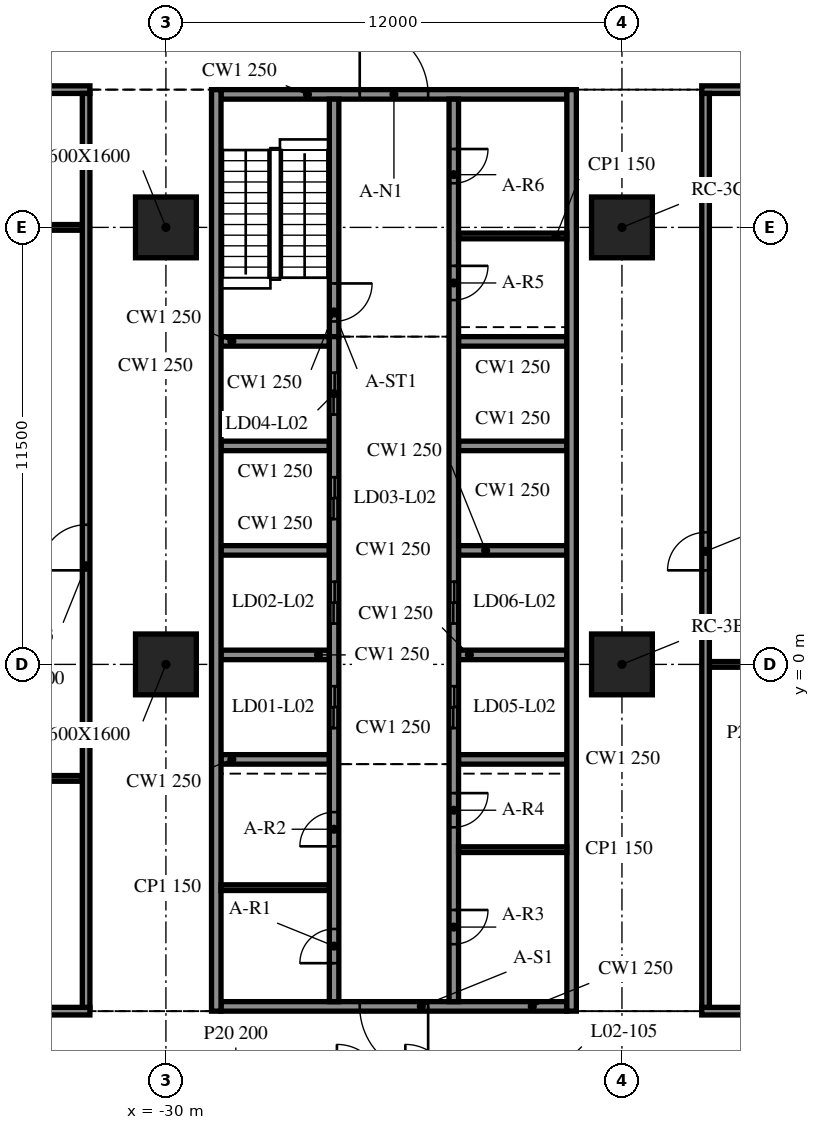
"""IFC4 building model, lengths in metres.
Left out: names, types, materials, properties, quantities, classifications, styles, units other than length and angle.
Written with IfcOpenShell. Run it as: python <this file> out.ifc"""

import sys

from ifc_helpers import new_model, si_unit, direction, frame, frame_2d, origin, origin_2d, place, context, subcontext, project, spatial, rectangle, extrude, element, fill, save


model = new_model("IFC4")
c1 = context("Model", 3, precision=1e-05, world=origin(), true_north=direction((0.0, 1.0)))
c2 = subcontext(c1, "Body", "Model", "MODEL_VIEW")
j1 = project(units=[si_unit("LENGTHUNIT", "METRE"), si_unit("PLANEANGLEUNIT", "RADIAN")], contexts=[c1])
p1 = place(None, origin())
s1 = spatial("IfcSite", under=j1, at=p1, CompositionType="ELEMENT")
p2 = place(p1, origin())
s2 = spatial("IfcBuilding", under=s1, at=p2, CompositionType="ELEMENT")
p3 = place(p2, frame((0.0, 0.0, 11.5)))
s3 = spatial("IfcBuildingStorey", under=s2, at=p3, CompositionType="ELEMENT", Elevation=11.5)
for number, where, z_axis, x_axis in (
    (1, (-30.0, 0.0, -0.34), (0.0, 0.0, 1.0), (1.0, 0.0, 0.0)),
    (2, (-30.0, 11.5, -0.34), (0.0, 0.0, 1.0), (1.0, 0.0, 0.0)),
    (3, (-18.0, 0.0, -0.34), (0.0, 0.0, 1.0), (1.0, 0.0, 0.0)),
    (4, (-18.0, 11.5, -0.34), (0.0, 0.0, 1.0), (1.0, 0.0, 0.0)),
):
    element("IfcColumn", number, at=place(p3, frame(where, z_axis=z_axis, x_axis=x_axis)), inside=s3, PredefinedType="COLUMN", context=c2, shape_type="SweptSolid", body=[
        extrude(rectangle(XDim=1.6, YDim=1.6, at=origin_2d()), origin(), (0.0, 0.0, 1.0), 4.3),
    ])
for number, where, z_axis, x_axis in (
    (5, (-28.675, 15.125, 0.0), (0.0, 0.0, 1.0), (0.0, -1.0, 0.0)),
    (6, (-19.325, -9.125, 0.0), (0.0, 0.0, 1.0), (0.0, 1.0, 0.0)),
):
    element("IfcWall", number, at=place(p3, frame(where, z_axis=z_axis, x_axis=x_axis)), inside=s3, PredefinedType="SOLIDWALL", context=c2, shape_type="SweptSolid", body=[
        extrude(rectangle(XDim=24.25, YDim=0.25, at=frame_2d((12.125, 0.0))), origin(), (0.0, 0.0, 1.0), 3.96),
    ])
p4 = place(p3, frame((-19.45, -9.0, 0.0), z_axis=(0.0, 0.0, 1.0), x_axis=(-1.0, 0.0, 0.0)))
e7 = element("IfcWall", 7, at=p4, inside=s3, PredefinedType="SOLIDWALL", context=c2, shape_type="SweptSolid", body=[
    extrude(rectangle(XDim=9.1, YDim=0.25, at=frame_2d((4.55, 0.0))), origin(), (0.0, 0.0, 1.0), 3.96),
])
p5 = place(p4, frame((3.65, 0.0, 0.0)))
e8 = element("IfcOpeningElement", 8, at=p5, cuts=e7, PredefinedType="OPENING", context=c2, shape_type="SweptSolid", body=[
    extrude(rectangle(XDim=1.8, YDim=2.1, at=frame_2d((0.9, 1.05))), frame((0.0, 0.135, 0.0), z_axis=(0.0, -1.0, 0.0), x_axis=(1.0, 0.0, 0.0)), (0.0, 0.0, 1.0), 0.27),
])
p6 = place(p3, frame((-28.55, 15.0, 0.0), z_axis=(0.0, 0.0, 1.0), x_axis=(1.0, 0.0, 0.0)))
e9 = element("IfcWall", 9, at=p6, inside=s3, PredefinedType="SOLIDWALL", context=c2, shape_type="SweptSolid", body=[
    extrude(rectangle(XDim=9.1, YDim=0.25, at=frame_2d((4.55, 0.0))), origin(), (0.0, 0.0, 1.0), 3.96),
])
p7 = place(p6, frame((3.65, 0.0, 0.0)))
e10 = element("IfcOpeningElement", 10, at=p7, cuts=e9, PredefinedType="OPENING", context=c2, shape_type="SweptSolid", body=[
    extrude(rectangle(XDim=1.8, YDim=2.1, at=frame_2d((0.9, 1.05))), frame((0.0, 0.135, 0.0), z_axis=(0.0, -1.0, 0.0), x_axis=(1.0, 0.0, 0.0)), (0.0, 0.0, 1.0), 0.27),
])
p8 = place(p3, frame((-25.575, -8.875, 0.0), z_axis=(0.0, 0.0, 1.0), x_axis=(0.0, 1.0, 0.0)))
e11 = element("IfcWall", 11, at=p8, inside=s3, PredefinedType="SOLIDWALL", context=c2, shape_type="SweptSolid", body=[
    extrude(rectangle(XDim=17.5, YDim=0.25, at=frame_2d((8.75, 0.0))), origin(), (0.0, 0.0, 1.0), 3.96),
])
p9 = place(p8, frame((7.2, 0.0, 0.0)))
e12 = element("IfcOpeningElement", 12, at=p9, cuts=e11, PredefinedType="OPENING", context=c2, shape_type="SweptSolid", body=[
    extrude(rectangle(XDim=1.1, YDim=2.1, at=frame_2d((0.55, 1.05))), frame((0.0, 0.135, 0.0), z_axis=(0.0, -1.0, 0.0), x_axis=(1.0, 0.0, 0.0)), (0.0, 0.0, 1.0), 0.27),
])
p10 = place(p8, frame((9.95, 0.0, 0.0)))
e13 = element("IfcOpeningElement", 13, at=p10, cuts=e11, PredefinedType="OPENING", context=c2, shape_type="SweptSolid", body=[
    extrude(rectangle(XDim=1.1, YDim=2.1, at=frame_2d((0.55, 1.05))), frame((0.0, 0.135, 0.0), z_axis=(0.0, -1.0, 0.0), x_axis=(1.0, 0.0, 0.0)), (0.0, 0.0, 1.0), 0.27),
])
p11 = place(p8, frame((12.7, 0.0, 0.0)))
e14 = element("IfcOpeningElement", 14, at=p11, cuts=e11, PredefinedType="OPENING", context=c2, shape_type="SweptSolid", body=[
    extrude(rectangle(XDim=1.1, YDim=2.1, at=frame_2d((0.55, 1.05))), frame((0.0, 0.135, 0.0), z_axis=(0.0, -1.0, 0.0), x_axis=(1.0, 0.0, 0.0)), (0.0, 0.0, 1.0), 0.27),
])
p12 = place(p8, frame((15.45, 0.0, 0.0)))
e15 = element("IfcOpeningElement", 15, at=p12, cuts=e11, PredefinedType="OPENING", context=c2, shape_type="SweptSolid", body=[
    extrude(rectangle(XDim=1.1, YDim=2.1, at=frame_2d((0.55, 1.05))), frame((0.0, 0.135, 0.0), z_axis=(0.0, -1.0, 0.0), x_axis=(1.0, 0.0, 0.0)), (0.0, 0.0, 1.0), 0.27),
])
p13 = place(p8, frame((1.012, 0.0, 0.0)))
e16 = element("IfcOpeningElement", 16, at=p13, cuts=e11, PredefinedType="OPENING", context=c2, shape_type="SweptSolid", body=[
    extrude(rectangle(XDim=0.9, YDim=2.1, at=frame_2d((0.45, 1.05))), frame((0.0, 0.135, 0.0), z_axis=(0.0, -1.0, 0.0), x_axis=(1.0, 0.0, 0.0)), (0.0, 0.0, 1.0), 0.27),
])
p14 = place(p8, frame((4.087, 0.0, 0.0)))
e17 = element("IfcOpeningElement", 17, at=p14, cuts=e11, PredefinedType="OPENING", context=c2, shape_type="SweptSolid", body=[
    extrude(rectangle(XDim=0.9, YDim=2.1, at=frame_2d((0.45, 1.05))), frame((0.0, 0.135, 0.0), z_axis=(0.0, -1.0, 0.0), x_axis=(1.0, 0.0, 0.0)), (0.0, 0.0, 1.0), 0.27),
])
p15 = place(p3, frame((-25.575, 14.875, 0.0), z_axis=(0.0, 0.0, 1.0), x_axis=(0.0, -1.0, 0.0)))
e18 = element("IfcWall", 18, at=p15, inside=s3, PredefinedType="SOLIDWALL", context=c2, shape_type="SweptSolid", body=[
    extrude(rectangle(XDim=6.25, YDim=0.25, at=frame_2d((3.125, 0.0))), origin(), (0.0, 0.0, 1.0), 3.96),
])
p16 = place(p15, frame((4.85, 0.0, 0.0)))
e19 = element("IfcOpeningElement", 19, at=p16, cuts=e18, PredefinedType="OPENING", context=c2, shape_type="SweptSolid", body=[
    extrude(rectangle(XDim=1.0, YDim=2.1, at=frame_2d((0.5, 1.05))), frame((0.0, 0.135, 0.0), z_axis=(0.0, -1.0, 0.0), x_axis=(1.0, 0.0, 0.0)), (0.0, 0.0, 1.0), 0.27),
])
p17 = place(p3, frame((-22.425, 14.875, 0.0), z_axis=(0.0, 0.0, 1.0), x_axis=(0.0, -1.0, 0.0)))
e20 = element("IfcWall", 20, at=p17, inside=s3, PredefinedType="SOLIDWALL", context=c2, shape_type="SweptSolid", body=[
    extrude(rectangle(XDim=23.75, YDim=0.25, at=frame_2d((11.875, 0.0))), origin(), (0.0, 0.0, 1.0), 3.96),
])
p18 = place(p17, frame((15.45, 0.0, 0.0)))
e21 = element("IfcOpeningElement", 21, at=p18, cuts=e20, PredefinedType="OPENING", context=c2, shape_type="SweptSolid", body=[
    extrude(rectangle(XDim=1.1, YDim=2.1, at=frame_2d((0.55, 1.05))), frame((0.0, 0.135, 0.0), z_axis=(0.0, -1.0, 0.0), x_axis=(1.0, 0.0, 0.0)), (0.0, 0.0, 1.0), 0.27),
])
p19 = place(p17, frame((12.7, 0.0, 0.0)))
e22 = element("IfcOpeningElement", 22, at=p19, cuts=e20, PredefinedType="OPENING", context=c2, shape_type="SweptSolid", body=[
    extrude(rectangle(XDim=1.1, YDim=2.1, at=frame_2d((0.55, 1.05))), frame((0.0, 0.135, 0.0), z_axis=(0.0, -1.0, 0.0), x_axis=(1.0, 0.0, 0.0)), (0.0, 0.0, 1.0), 0.27),
])
p20 = place(p17, frame((21.337, 0.0, 0.0)))
e23 = element("IfcOpeningElement", 23, at=p20, cuts=e20, PredefinedType="OPENING", context=c2, shape_type="SweptSolid", body=[
    extrude(rectangle(XDim=0.9, YDim=2.1, at=frame_2d((0.45, 1.05))), frame((0.0, 0.135, 0.0), z_axis=(0.0, -1.0, 0.0), x_axis=(1.0, 0.0, 0.0)), (0.0, 0.0, 1.0), 0.27),
])
p21 = place(p17, frame((18.262, 0.0, 0.0)))
e24 = element("IfcOpeningElement", 24, at=p21, cuts=e20, PredefinedType="OPENING", context=c2, shape_type="SweptSolid", body=[
    extrude(rectangle(XDim=0.9, YDim=2.1, at=frame_2d((0.45, 1.05))), frame((0.0, 0.135, 0.0), z_axis=(0.0, -1.0, 0.0), x_axis=(1.0, 0.0, 0.0)), (0.0, 0.0, 1.0), 0.27),
])
p22 = place(p17, frame((4.387, 0.0, 0.0)))
e25 = element("IfcOpeningElement", 25, at=p22, cuts=e20, PredefinedType="OPENING", context=c2, shape_type="SweptSolid", body=[
    extrude(rectangle(XDim=0.9, YDim=2.1, at=frame_2d((0.45, 1.05))), frame((0.0, 0.135, 0.0), z_axis=(0.0, -1.0, 0.0), x_axis=(1.0, 0.0, 0.0)), (0.0, 0.0, 1.0), 0.27),
])
p23 = place(p17, frame((1.312, 0.0, 0.0)))
e26 = element("IfcOpeningElement", 26, at=p23, cuts=e20, PredefinedType="OPENING", context=c2, shape_type="SweptSolid", body=[
    extrude(rectangle(XDim=0.9, YDim=2.1, at=frame_2d((0.45, 1.05))), frame((0.0, 0.135, 0.0), z_axis=(0.0, -1.0, 0.0), x_axis=(1.0, 0.0, 0.0)), (0.0, 0.0, 1.0), 0.27),
])
for number, where, z_axis, x_axis in (
    (27, (-28.55, -2.5, 0.0), (0.0, 0.0, 1.0), (1.0, 0.0, 0.0)),
    (28, (-28.55, 0.25, 0.0), (0.0, 0.0, 1.0), (1.0, 0.0, 0.0)),
    (29, (-28.55, 3.0, 0.0), (0.0, 0.0, 1.0), (1.0, 0.0, 0.0)),
    (30, (-28.55, 5.75, 0.0), (0.0, 0.0, 1.0), (1.0, 0.0, 0.0)),
    (31, (-28.55, 8.5, 0.0), (0.0, 0.0, 1.0), (1.0, 0.0, 0.0)),
    (32, (-22.3, -2.5, 0.0), (0.0, 0.0, 1.0), (1.0, 0.0, 0.0)),
    (33, (-22.3, 0.25, 0.0), (0.0, 0.0, 1.0), (1.0, 0.0, 0.0)),
    (34, (-22.3, 3.0, 0.0), (0.0, 0.0, 1.0), (1.0, 0.0, 0.0)),
    (35, (-22.3, 5.75, 0.0), (0.0, 0.0, 1.0), (1.0, 0.0, 0.0)),
    (36, (-22.3, 8.5, 0.0), (0.0, 0.0, 1.0), (1.0, 0.0, 0.0)),
):
    element("IfcWall", number, at=place(p3, frame(where, z_axis=z_axis, x_axis=x_axis)), inside=s3, PredefinedType="SOLIDWALL", context=c2, shape_type="SweptSolid", body=[
        extrude(rectangle(XDim=2.85, YDim=0.25, at=frame_2d((1.425, 0.0))), origin(), (0.0, 0.0, 1.0), 3.96),
    ])
for number, where, z_axis, x_axis in (
    (37, (-28.55, -5.875, 0.0), (0.0, 0.0, 1.0), (1.0, 0.0, 0.0)),
    (38, (-22.3, -4.875, 0.0), (0.0, 0.0, 1.0), (1.0, 0.0, 0.0)),
    (39, (-22.3, 11.275, 0.0), (0.0, 0.0, 1.0), (1.0, 0.0, 0.0)),
):
    element("IfcWall", number, at=place(p3, frame(where, z_axis=z_axis, x_axis=x_axis)), inside=s3, PredefinedType="PARTITIONING", context=c2, shape_type="SweptSolid", body=[
        extrude(rectangle(XDim=2.85, YDim=0.15, at=frame_2d((1.425, 0.0))), origin(), (0.0, 0.0, 1.0), 3.96),
    ])
p24 = place(p3, frame((-45.95, -9.125, 0.0), z_axis=(0.0, 0.0, 1.0), x_axis=(1.0, 0.0, 0.0)))
e40 = element("IfcWall", 40, at=p24, inside=s3, PredefinedType="PARTITIONING", context=c2, shape_type="SweptSolid", body=[
    extrude(rectangle(XDim=13.95, YDim=0.2, at=frame_2d((6.975, 0.0))), origin(), (0.0, 0.0, 1.0), 3.96),
])
p25 = place(p24, frame((5.5, 0.0, 0.0)))
e41 = element("IfcOpeningElement", 41, at=p25, cuts=e40, PredefinedType="OPENING", context=c2, shape_type="SweptSolid", body=[
    extrude(rectangle(XDim=1.2, YDim=2.1, at=frame_2d((0.6, 1.05))), frame((0.0, 0.11, 0.0), z_axis=(0.0, -1.0, 0.0), x_axis=(1.0, 0.0, 0.0)), (0.0, 0.0, 1.0), 0.22),
])
p26 = place(p24, frame((7.3, 0.0, 0.0)))
e42 = element("IfcOpeningElement", 42, at=p26, cuts=e40, PredefinedType="OPENING", context=c2, shape_type="SweptSolid", body=[
    extrude(rectangle(XDim=1.2, YDim=2.1, at=frame_2d((0.6, 1.05))), frame((0.0, 0.11, 0.0), z_axis=(0.0, -1.0, 0.0), x_axis=(1.0, 0.0, 0.0)), (0.0, 0.0, 1.0), 0.22),
])
p27 = place(p3, frame((-15.9, -9.125, 0.0), z_axis=(0.0, 0.0, 1.0), x_axis=(1.0, 0.0, 0.0)))
e43 = element("IfcWall", 43, at=p27, inside=s3, PredefinedType="PARTITIONING", context=c2, shape_type="SweptSolid", body=[
    extrude(rectangle(XDim=7.7, YDim=0.2, at=frame_2d((3.85, 0.0))), origin(), (0.0, 0.0, 1.0), 3.96),
])
p28 = place(p27, frame((3.3, 0.0, 0.0)))
e44 = element("IfcOpeningElement", 44, at=p28, cuts=e43, PredefinedType="OPENING", context=c2, shape_type="SweptSolid", body=[
    extrude(rectangle(XDim=1.0, YDim=2.1, at=frame_2d((0.5, 1.05))), frame((0.0, 0.11, 0.0), z_axis=(0.0, -1.0, 0.0), x_axis=(1.0, 0.0, 0.0)), (0.0, 0.0, 1.0), 0.22),
])
p29 = place(p3, frame((-45.75, -3.0, 0.0), z_axis=(0.0, 0.0, 1.0), x_axis=(1.0, 0.0, 0.0)))
e45 = element("IfcWall", 45, at=p29, inside=s3, PredefinedType="PARTITIONING", context=c2, shape_type="SweptSolid", body=[
    extrude(rectangle(XDim=13.55, YDim=0.15, at=frame_2d((6.775, 0.0))), origin(), (0.0, 0.0, 1.0), 3.96),
])
p30 = place(p3, frame((-15.7, 0.0, 0.0), z_axis=(0.0, 0.0, 1.0), x_axis=(1.0, 0.0, 0.0)))
e46 = element("IfcWall", 46, at=p30, inside=s3, PredefinedType="PARTITIONING", context=c2, shape_type="SweptSolid", body=[
    extrude(rectangle(XDim=7.3, YDim=0.15, at=frame_2d((3.65, 0.0))), origin(), (0.0, 0.0, 1.0), 3.96),
])
p31 = place(p3, frame((-41.2, 11.5, 0.0), z_axis=(0.0, 0.0, 1.0), x_axis=(1.0, 0.0, 0.0)))
e47 = element("IfcWall", 47, at=p31, inside=s3, PredefinedType="PARTITIONING", context=c2, shape_type="SweptSolid", body=[
    extrude(rectangle(XDim=9.0, YDim=0.15, at=frame_2d((4.5, 0.0))), origin(), (0.0, 0.0, 1.0), 3.96),
])
p32 = place(p3, frame((-45.95, 15.125, 0.0), z_axis=(0.0, 0.0, 1.0), x_axis=(1.0, 0.0, 0.0)))
e48 = element("IfcWall", 48, at=p32, inside=s3, PredefinedType="PARTITIONING", context=c2, shape_type="SweptSolid", body=[
    extrude(rectangle(XDim=13.95, YDim=0.2, at=frame_2d((6.975, 0.0))), origin(), (0.0, 0.0, 1.0), 3.96),
])
p33 = place(p32, frame((5.5, 0.0, 0.0)))
e49 = element("IfcOpeningElement", 49, at=p33, cuts=e48, PredefinedType="OPENING", context=c2, shape_type="SweptSolid", body=[
    extrude(rectangle(XDim=1.2, YDim=2.1, at=frame_2d((0.6, 1.05))), frame((0.0, 0.11, 0.0), z_axis=(0.0, -1.0, 0.0), x_axis=(1.0, 0.0, 0.0)), (0.0, 0.0, 1.0), 0.22),
])
p34 = place(p32, frame((7.3, 0.0, 0.0)))
e50 = element("IfcOpeningElement", 50, at=p34, cuts=e48, PredefinedType="OPENING", context=c2, shape_type="SweptSolid", body=[
    extrude(rectangle(XDim=1.2, YDim=2.1, at=frame_2d((0.6, 1.05))), frame((0.0, 0.11, 0.0), z_axis=(0.0, -1.0, 0.0), x_axis=(1.0, 0.0, 0.0)), (0.0, 0.0, 1.0), 0.22),
])
p35 = place(p3, frame((-15.9, 15.125, 0.0), z_axis=(0.0, 0.0, 1.0), x_axis=(1.0, 0.0, 0.0)))
e51 = element("IfcWall", 51, at=p35, inside=s3, PredefinedType="PARTITIONING", context=c2, shape_type="SweptSolid", body=[
    extrude(rectangle(XDim=7.7, YDim=0.2, at=frame_2d((3.85, 0.0))), origin(), (0.0, 0.0, 1.0), 3.96),
])
p36 = place(p3, frame((-32.1, -9.025, 0.0), z_axis=(0.0, 0.0, 1.0), x_axis=(0.0, 1.0, 0.0)))
e52 = element("IfcWall", 52, at=p36, inside=s3, PredefinedType="PARTITIONING", context=c2, shape_type="SweptSolid", body=[
    extrude(rectangle(XDim=24.05, YDim=0.2, at=frame_2d((12.025, 0.0))), origin(), (0.0, 0.0, 1.0), 3.96),
])
p37 = place(p36, frame((11.5, 0.0, 0.0)))
e53 = element("IfcOpeningElement", 53, at=p37, cuts=e52, PredefinedType="OPENING", context=c2, shape_type="SweptSolid", body=[
    extrude(rectangle(XDim=1.2, YDim=2.1, at=frame_2d((0.6, 1.05))), frame((0.0, 0.11, 0.0), z_axis=(0.0, -1.0, 0.0), x_axis=(1.0, 0.0, 0.0)), (0.0, 0.0, 1.0), 0.22),
])
p38 = place(p3, frame((-15.8, -9.025, 0.0), z_axis=(0.0, 0.0, 1.0), x_axis=(0.0, 1.0, 0.0)))
e54 = element("IfcWall", 54, at=p38, inside=s3, PredefinedType="PARTITIONING", context=c2, shape_type="SweptSolid", body=[
    extrude(rectangle(XDim=24.05, YDim=0.2, at=frame_2d((12.025, 0.0))), origin(), (0.0, 0.0, 1.0), 3.96),
])
p39 = place(p38, frame((11.5, 0.0, 0.0)))
e55 = element("IfcOpeningElement", 55, at=p39, cuts=e54, PredefinedType="OPENING", context=c2, shape_type="SweptSolid", body=[
    extrude(rectangle(XDim=1.0, YDim=2.1, at=frame_2d((0.5, 1.05))), frame((0.0, 0.11, 0.0), z_axis=(0.0, -1.0, 0.0), x_axis=(1.0, 0.0, 0.0)), (0.0, 0.0, 1.0), 0.22),
])
p40 = place(p5, origin())
e56 = element("IfcDoor", 56, at=p40, inside=s3, OperationType="DOUBLE_DOOR_SINGLE_SWING", PredefinedType="DOOR", context=c2, shape_type="SweptSolid", body=[
    extrude(rectangle(XDim=1.8, YDim=2.1, at=frame_2d((0.9, 1.05))), frame((0.0, 0.025, 0.0), z_axis=(0.0, -1.0, 0.0), x_axis=(1.0, 0.0, 0.0)), (0.0, 0.0, 1.0), 0.05),
])
fill(e8, e56)
p41 = place(p7, origin())
e57 = element("IfcDoor", 57, at=p41, inside=s3, OperationType="DOUBLE_DOOR_SINGLE_SWING", PredefinedType="DOOR", context=c2, shape_type="SweptSolid", body=[
    extrude(rectangle(XDim=1.8, YDim=2.1, at=frame_2d((0.9, 1.05))), frame((0.0, 0.025, 0.0), z_axis=(0.0, -1.0, 0.0), x_axis=(1.0, 0.0, 0.0)), (0.0, 0.0, 1.0), 0.05),
])
fill(e10, e57)
p42 = place(p18, origin())
e58 = element("IfcDoor", 58, at=p42, inside=s3, OperationType="DOUBLE_DOOR_SLIDING", PredefinedType="DOOR", context=c2, shape_type="SweptSolid", body=[
    extrude(rectangle(XDim=1.1, YDim=2.1, at=frame_2d((0.55, 1.05))), frame((0.0, 0.025, 0.0), z_axis=(0.0, -1.0, 0.0), x_axis=(1.0, 0.0, 0.0)), (0.0, 0.0, 1.0), 0.05),
])
fill(e21, e58)
p43 = place(p19, origin())
e59 = element("IfcDoor", 59, at=p43, inside=s3, OperationType="DOUBLE_DOOR_SLIDING", PredefinedType="DOOR", context=c2, shape_type="SweptSolid", body=[
    extrude(rectangle(XDim=1.1, YDim=2.1, at=frame_2d((0.55, 1.05))), frame((0.0, 0.025, 0.0), z_axis=(0.0, -1.0, 0.0), x_axis=(1.0, 0.0, 0.0)), (0.0, 0.0, 1.0), 0.05),
])
fill(e22, e59)
p44 = place(p9, origin())
e60 = element("IfcDoor", 60, at=p44, inside=s3, OperationType="DOUBLE_DOOR_SLIDING", PredefinedType="DOOR", context=c2, shape_type="SweptSolid", body=[
    extrude(rectangle(XDim=1.1, YDim=2.1, at=frame_2d((0.55, 1.05))), frame((0.0, 0.025, 0.0), z_axis=(0.0, -1.0, 0.0), x_axis=(1.0, 0.0, 0.0)), (0.0, 0.0, 1.0), 0.05),
])
fill(e12, e60)
p45 = place(p10, origin())
e61 = element("IfcDoor", 61, at=p45, inside=s3, OperationType="DOUBLE_DOOR_SLIDING", PredefinedType="DOOR", context=c2, shape_type="SweptSolid", body=[
    extrude(rectangle(XDim=1.1, YDim=2.1, at=frame_2d((0.55, 1.05))), frame((0.0, 0.025, 0.0), z_axis=(0.0, -1.0, 0.0), x_axis=(1.0, 0.0, 0.0)), (0.0, 0.0, 1.0), 0.05),
])
fill(e13, e61)
p46 = place(p11, origin())
e62 = element("IfcDoor", 62, at=p46, inside=s3, OperationType="DOUBLE_DOOR_SLIDING", PredefinedType="DOOR", context=c2, shape_type="SweptSolid", body=[
    extrude(rectangle(XDim=1.1, YDim=2.1, at=frame_2d((0.55, 1.05))), frame((0.0, 0.025, 0.0), z_axis=(0.0, -1.0, 0.0), x_axis=(1.0, 0.0, 0.0)), (0.0, 0.0, 1.0), 0.05),
])
fill(e14, e62)
p47 = place(p12, origin())
e63 = element("IfcDoor", 63, at=p47, inside=s3, OperationType="DOUBLE_DOOR_SLIDING", PredefinedType="DOOR", context=c2, shape_type="SweptSolid", body=[
    extrude(rectangle(XDim=1.1, YDim=2.1, at=frame_2d((0.55, 1.05))), frame((0.0, 0.025, 0.0), z_axis=(0.0, -1.0, 0.0), x_axis=(1.0, 0.0, 0.0)), (0.0, 0.0, 1.0), 0.05),
])
fill(e15, e63)
p48 = place(p13, origin())
e64 = element("IfcDoor", 64, at=p48, inside=s3, OperationType="SINGLE_SWING_LEFT", PredefinedType="DOOR", context=c2, shape_type="SweptSolid", body=[
    extrude(rectangle(XDim=0.9, YDim=2.1, at=frame_2d((0.45, 1.05))), frame((0.0, 0.025, 0.0), z_axis=(0.0, -1.0, 0.0), x_axis=(1.0, 0.0, 0.0)), (0.0, 0.0, 1.0), 0.05),
])
fill(e16, e64)
p49 = place(p14, origin())
e65 = element("IfcDoor", 65, at=p49, inside=s3, OperationType="SINGLE_SWING_RIGHT", PredefinedType="DOOR", context=c2, shape_type="SweptSolid", body=[
    extrude(rectangle(XDim=0.9, YDim=2.1, at=frame_2d((0.45, 1.05))), frame((0.0, 0.025, 0.0), z_axis=(0.0, -1.0, 0.0), x_axis=(1.0, 0.0, 0.0)), (0.0, 0.0, 1.0), 0.05),
])
fill(e17, e65)
p50 = place(p20, origin())
e66 = element("IfcDoor", 66, at=p50, inside=s3, OperationType="SINGLE_SWING_LEFT", PredefinedType="DOOR", context=c2, shape_type="SweptSolid", body=[
    extrude(rectangle(XDim=0.9, YDim=2.1, at=frame_2d((0.45, 1.05))), frame((0.0, 0.025, 0.0), z_axis=(0.0, -1.0, 0.0), x_axis=(1.0, 0.0, 0.0)), (0.0, 0.0, 1.0), 0.05),
])
fill(e23, e66)
p51 = place(p21, origin())
e67 = element("IfcDoor", 67, at=p51, inside=s3, OperationType="SINGLE_SWING_RIGHT", PredefinedType="DOOR", context=c2, shape_type="SweptSolid", body=[
    extrude(rectangle(XDim=0.9, YDim=2.1, at=frame_2d((0.45, 1.05))), frame((0.0, 0.025, 0.0), z_axis=(0.0, -1.0, 0.0), x_axis=(1.0, 0.0, 0.0)), (0.0, 0.0, 1.0), 0.05),
])
fill(e24, e67)
p52 = place(p22, origin())
e68 = element("IfcDoor", 68, at=p52, inside=s3, OperationType="SINGLE_SWING_LEFT", PredefinedType="DOOR", context=c2, shape_type="SweptSolid", body=[
    extrude(rectangle(XDim=0.9, YDim=2.1, at=frame_2d((0.45, 1.05))), frame((0.0, 0.025, 0.0), z_axis=(0.0, -1.0, 0.0), x_axis=(1.0, 0.0, 0.0)), (0.0, 0.0, 1.0), 0.05),
])
fill(e25, e68)
p53 = place(p23, origin())
e69 = element("IfcDoor", 69, at=p53, inside=s3, OperationType="SINGLE_SWING_RIGHT", PredefinedType="DOOR", context=c2, shape_type="SweptSolid", body=[
    extrude(rectangle(XDim=0.9, YDim=2.1, at=frame_2d((0.45, 1.05))), frame((0.0, 0.025, 0.0), z_axis=(0.0, -1.0, 0.0), x_axis=(1.0, 0.0, 0.0)), (0.0, 0.0, 1.0), 0.05),
])
fill(e26, e69)
p54 = place(p16, origin())
e70 = element("IfcDoor", 70, at=p54, inside=s3, OperationType="SINGLE_SWING_LEFT", PredefinedType="DOOR", context=c2, shape_type="SweptSolid", body=[
    extrude(rectangle(XDim=1.0, YDim=2.1, at=frame_2d((0.5, 1.05))), frame((0.0, 0.025, 0.0), z_axis=(0.0, -1.0, 0.0), x_axis=(1.0, 0.0, 0.0)), (0.0, 0.0, 1.0), 0.05),
])
fill(e19, e70)
p55 = place(p37, origin())
e71 = element("IfcDoor", 71, at=p55, inside=s3, OperationType="SINGLE_SWING_RIGHT", PredefinedType="DOOR", context=c2, shape_type="SweptSolid", body=[
    extrude(rectangle(XDim=1.2, YDim=2.1, at=frame_2d((0.6, 1.05))), frame((0.0, 0.025, 0.0), z_axis=(0.0, -1.0, 0.0), x_axis=(1.0, 0.0, 0.0)), (0.0, 0.0, 1.0), 0.05),
])
fill(e53, e71)
p56 = place(p39, origin())
e72 = element("IfcDoor", 72, at=p56, inside=s3, OperationType="SINGLE_SWING_RIGHT", PredefinedType="DOOR", context=c2, shape_type="SweptSolid", body=[
    extrude(rectangle(XDim=1.0, YDim=2.1, at=frame_2d((0.5, 1.05))), frame((0.0, 0.025, 0.0), z_axis=(0.0, -1.0, 0.0), x_axis=(1.0, 0.0, 0.0)), (0.0, 0.0, 1.0), 0.05),
])
fill(e55, e72)
save(model, sys.argv[1])
